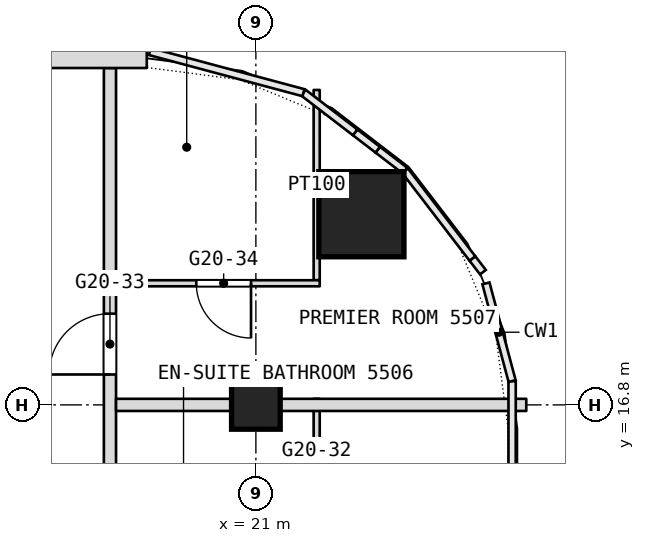
"""IFC4 building model, lengths in metres.
Left out: names, types, materials, properties, quantities, classifications, styles, units other than length and angle.
Written with IfcOpenShell. Run it as: python <this file> out.ifc"""

import sys

from ifc_helpers import new_model, si_unit, direction, frame, frame_2d, origin, origin_2d, place, context, subcontext, project, spatial, rectangle, extrude, element, fill, save


model = new_model("IFC4")
c1 = context("Model", 3, precision=1e-05, world=origin(), true_north=direction((0.0, 1.0)))
c2 = subcontext(c1, "Body", "Model", "MODEL_VIEW")
j1 = project(units=[si_unit("LENGTHUNIT", "METRE"), si_unit("PLANEANGLEUNIT", "RADIAN")], contexts=[c1])
p1 = place(None, origin())
s1 = spatial("IfcSite", under=j1, at=p1, CompositionType="ELEMENT")
p2 = place(p1, origin())
s2 = spatial("IfcBuilding", under=s1, at=p2, CompositionType="ELEMENT")
p3 = place(p2, frame((0.0, 0.0, 234.5)))
s3 = spatial("IfcBuildingStorey", under=s2, at=p3, CompositionType="ELEMENT", Elevation=234.5)
p4 = place(p3, frame((22.736, 19.936, 0.0), z_axis=(0.0, 0.0, 1.0), x_axis=(1.0, 0.0, 0.0)))
e1 = element("IfcColumn", 1, at=p4, inside=s3, PredefinedType="COLUMN", context=c2, shape_type="SweptSolid", body=[
    extrude(rectangle(XDim=1.4, YDim=1.4, at=origin_2d()), origin(), (0.0, 0.0, 1.0), 3.6),
])
p5 = place(p3, frame((21.0, 16.8, 0.0), z_axis=(0.0, 0.0, 1.0), x_axis=(1.0, 0.0, 0.0)))
e2 = element("IfcColumn", 2, at=p5, inside=s3, PredefinedType="COLUMN", context=c2, shape_type="SweptSolid", body=[
    extrude(rectangle(XDim=0.8, YDim=0.8, at=origin_2d()), origin(), (0.0, 0.0, 1.0), 3.6),
])
p6 = place(p3, frame((22.0, 14.45, 0.0), z_axis=(0.0, 0.0, 1.0), x_axis=(0.0, 1.0, 0.0)))
e3 = element("IfcWall", 3, at=p6, inside=s3, PredefinedType="PARTITIONING", context=c2, shape_type="SweptSolid", body=[
    extrude(rectangle(XDim=2.45, YDim=0.1, at=frame_2d((1.225, 0.0))), origin(), (0.0, 0.0, 1.0), 3.34),
])
p7 = place(p6, frame((0.15, 0.0, 0.0)))
e4 = element("IfcOpeningElement", 4, at=p7, cuts=e3, PredefinedType="OPENING", context=c2, shape_type="SweptSolid", body=[
    extrude(rectangle(XDim=0.9, YDim=2.1, at=frame_2d((0.45, 1.05))), frame((0.0, 0.05, 0.0), z_axis=(0.0, -1.0, 0.0), x_axis=(1.0, 0.0, 0.0)), (0.0, 0.0, 1.0), 0.1),
])
p8 = place(p3, frame((22.0, 18.85, 0.0), z_axis=(0.0, 0.0, 1.0), x_axis=(0.0, 1.0, 0.0)))
e5 = element("IfcWall", 5, at=p8, inside=s3, PredefinedType="PARTITIONING", context=c2, shape_type="SweptSolid", body=[
    extrude(rectangle(XDim=3.129, YDim=0.1, at=frame_2d((1.564, 0.0))), origin(), (0.0, 0.0, 1.0), 3.34),
])
p9 = place(p3, frame((18.6, -26.751, 0.0), z_axis=(0.0, 0.0, 1.0), x_axis=(0.0, 1.0, 0.0)))
e6 = element("IfcWall", 6, at=p9, inside=s3, PredefinedType="PARTITIONING", context=c2, shape_type="SweptSolid", body=[
    extrude(rectangle(XDim=49.091, YDim=0.2, at=frame_2d((24.545, 0.0))), origin(), (0.0, 0.0, 1.0), 3.34),
])
p10 = place(p9, frame((6.988, 0.0, 0.0)))
e7 = element("IfcOpeningElement", 7, at=p10, cuts=e6, PredefinedType="OPENING", context=c2, shape_type="SweptSolid", body=[
    extrude(rectangle(XDim=1.1, YDim=2.1, at=frame_2d((0.55, 1.05))), frame((0.0, 0.1, 0.0), z_axis=(0.0, -1.0, 0.0), x_axis=(1.0, 0.0, 0.0)), (0.0, 0.0, 1.0), 0.2),
])
p11 = place(p9, frame((13.551, 0.0, 0.0)))
e8 = element("IfcOpeningElement", 8, at=p11, cuts=e6, PredefinedType="OPENING", context=c2, shape_type="SweptSolid", body=[
    extrude(rectangle(XDim=1.1, YDim=2.1, at=frame_2d((0.55, 1.05))), frame((0.0, 0.1, 0.0), z_axis=(0.0, -1.0, 0.0), x_axis=(1.0, 0.0, 0.0)), (0.0, 0.0, 1.0), 0.2),
])
p12 = place(p9, frame((22.051, 0.0, 0.0)))
e9 = element("IfcOpeningElement", 9, at=p12, cuts=e6, PredefinedType="OPENING", context=c2, shape_type="SweptSolid", body=[
    extrude(rectangle(XDim=1.1, YDim=2.1, at=frame_2d((0.55, 1.05))), frame((0.0, 0.1, 0.0), z_axis=(0.0, -1.0, 0.0), x_axis=(1.0, 0.0, 0.0)), (0.0, 0.0, 1.0), 0.2),
])
p13 = place(p9, frame((28.301, 0.0, 0.0)))
e10 = element("IfcOpeningElement", 10, at=p13, cuts=e6, PredefinedType="OPENING", context=c2, shape_type="SweptSolid", body=[
    extrude(rectangle(XDim=1.1, YDim=2.1, at=frame_2d((0.55, 1.05))), frame((0.0, 0.1, 0.0), z_axis=(0.0, -1.0, 0.0), x_axis=(1.0, 0.0, 0.0)), (0.0, 0.0, 1.0), 0.2),
])
p14 = place(p9, frame((37.951, 0.0, 0.0)))
e11 = element("IfcOpeningElement", 11, at=p14, cuts=e6, PredefinedType="OPENING", context=c2, shape_type="SweptSolid", body=[
    extrude(rectangle(XDim=1.0, YDim=2.1, at=frame_2d((0.5, 1.05))), frame((0.0, 0.1, 0.0), z_axis=(0.0, -1.0, 0.0), x_axis=(1.0, 0.0, 0.0)), (0.0, 0.0, 1.0), 0.2),
])
p15 = place(p9, frame((39.751, 0.0, 0.0)))
e12 = element("IfcOpeningElement", 12, at=p15, cuts=e6, PredefinedType="OPENING", context=c2, shape_type="SweptSolid", body=[
    extrude(rectangle(XDim=1.0, YDim=2.1, at=frame_2d((0.5, 1.05))), frame((0.0, 0.1, 0.0), z_axis=(0.0, -1.0, 0.0), x_axis=(1.0, 0.0, 0.0)), (0.0, 0.0, 1.0), 0.2),
])
p16 = place(p9, frame((44.051, 0.0, 0.0)))
e13 = element("IfcOpeningElement", 13, at=p16, cuts=e6, PredefinedType="OPENING", context=c2, shape_type="SweptSolid", body=[
    extrude(rectangle(XDim=1.0, YDim=2.1, at=frame_2d((0.5, 1.05))), frame((0.0, 0.1, 0.0), z_axis=(0.0, -1.0, 0.0), x_axis=(1.0, 0.0, 0.0)), (0.0, 0.0, 1.0), 0.2),
])
p17 = place(p3, frame((18.7, 16.8, 0.0), z_axis=(0.0, 0.0, 1.0), x_axis=(1.0, 0.0, 0.0)))
e14 = element("IfcWall", 14, at=p17, inside=s3, PredefinedType="PARTITIONING", context=c2, shape_type="SweptSolid", body=[
    extrude(rectangle(XDim=6.747, YDim=0.2, at=frame_2d((3.374, 0.0))), origin(), (0.0, 0.0, 1.0), 2.94),
])
p18 = place(p3, frame((18.7, 18.8, 0.0), z_axis=(0.0, 0.0, 1.0), x_axis=(1.0, 0.0, 0.0)))
e15 = element("IfcWall", 15, at=p18, inside=s3, PredefinedType="PARTITIONING", context=c2, shape_type="SweptSolid", body=[
    extrude(rectangle(XDim=3.35, YDim=0.1, at=frame_2d((1.675, 0.0))), origin(), (0.0, 0.0, 1.0), 3.34),
])
p19 = place(p18, frame((1.32, 0.0, 0.0)))
e16 = element("IfcOpeningElement", 16, at=p19, cuts=e15, PredefinedType="OPENING", context=c2, shape_type="SweptSolid", body=[
    extrude(rectangle(XDim=0.9, YDim=2.1, at=frame_2d((0.45, 1.05))), frame((0.0, 0.05, 0.0), z_axis=(0.0, -1.0, 0.0), x_axis=(1.0, 0.0, 0.0)), (0.0, 0.0, 1.0), 0.1),
])
p20 = place(p3, frame((19.206, 22.49, 0.0), z_axis=(0.0, 0.0, 1.0), x_axis=(-1.0, 0.0, 0.0)))
e17 = element("IfcWall", 17, at=p20, inside=s3, PredefinedType="NOTDEFINED", context=c2, shape_type="SweptSolid", body=[
    extrude(rectangle(XDim=38.412, YDim=0.3, at=frame_2d((19.206, 0.0))), origin(), (0.0, 0.0, 1.0), 3.6),
])
p21 = place(p20, frame((3.306, 0.0, 0.9)))
e18 = element("IfcOpeningElement", 18, at=p21, cuts=e17, PredefinedType="OPENING", context=c2, shape_type="SweptSolid", body=[
    extrude(rectangle(XDim=2.4, YDim=2.1, at=frame_2d((1.2, 1.05))), frame((0.0, 0.15, 0.0), z_axis=(0.0, -1.0, 0.0), x_axis=(1.0, 0.0, 0.0)), (0.0, 0.0, 1.0), 0.3),
])
p22 = place(p20, frame((7.506, 0.0, 0.9)))
e19 = element("IfcOpeningElement", 19, at=p22, cuts=e17, PredefinedType="OPENING", context=c2, shape_type="SweptSolid", body=[
    extrude(rectangle(XDim=2.4, YDim=2.1, at=frame_2d((1.2, 1.05))), frame((0.0, 0.15, 0.0), z_axis=(0.0, -1.0, 0.0), x_axis=(1.0, 0.0, 0.0)), (0.0, 0.0, 1.0), 0.3),
])
p23 = place(p20, frame((11.706, 0.0, 0.9)))
e20 = element("IfcOpeningElement", 20, at=p23, cuts=e17, PredefinedType="OPENING", context=c2, shape_type="SweptSolid", body=[
    extrude(rectangle(XDim=2.4, YDim=2.1, at=frame_2d((1.2, 1.05))), frame((0.0, 0.15, 0.0), z_axis=(0.0, -1.0, 0.0), x_axis=(1.0, 0.0, 0.0)), (0.0, 0.0, 1.0), 0.3),
])
p24 = place(p20, frame((15.906, 0.0, 0.9)))
e21 = element("IfcOpeningElement", 21, at=p24, cuts=e17, PredefinedType="OPENING", context=c2, shape_type="SweptSolid", body=[
    extrude(rectangle(XDim=2.4, YDim=2.1, at=frame_2d((1.2, 1.05))), frame((0.0, 0.15, 0.0), z_axis=(0.0, -1.0, 0.0), x_axis=(1.0, 0.0, 0.0)), (0.0, 0.0, 1.0), 0.3),
])
p25 = place(p20, frame((20.106, 0.0, 0.9)))
e22 = element("IfcOpeningElement", 22, at=p25, cuts=e17, PredefinedType="OPENING", context=c2, shape_type="SweptSolid", body=[
    extrude(rectangle(XDim=2.4, YDim=2.1, at=frame_2d((1.2, 1.05))), frame((0.0, 0.15, 0.0), z_axis=(0.0, -1.0, 0.0), x_axis=(1.0, 0.0, 0.0)), (0.0, 0.0, 1.0), 0.3),
])
p26 = place(p20, frame((24.306, 0.0, 0.9)))
e23 = element("IfcOpeningElement", 23, at=p26, cuts=e17, PredefinedType="OPENING", context=c2, shape_type="SweptSolid", body=[
    extrude(rectangle(XDim=2.4, YDim=2.1, at=frame_2d((1.2, 1.05))), frame((0.0, 0.15, 0.0), z_axis=(0.0, -1.0, 0.0), x_axis=(1.0, 0.0, 0.0)), (0.0, 0.0, 1.0), 0.3),
])
p27 = place(p20, frame((28.506, 0.0, 0.9)))
e24 = element("IfcOpeningElement", 24, at=p27, cuts=e17, PredefinedType="OPENING", context=c2, shape_type="SweptSolid", body=[
    extrude(rectangle(XDim=2.4, YDim=2.1, at=frame_2d((1.2, 1.05))), frame((0.0, 0.15, 0.0), z_axis=(0.0, -1.0, 0.0), x_axis=(1.0, 0.0, 0.0)), (0.0, 0.0, 1.0), 0.3),
])
p28 = place(p20, frame((32.706, 0.0, 0.9)))
e25 = element("IfcOpeningElement", 25, at=p28, cuts=e17, PredefinedType="OPENING", context=c2, shape_type="SweptSolid", body=[
    extrude(rectangle(XDim=2.4, YDim=2.1, at=frame_2d((1.2, 1.05))), frame((0.0, 0.15, 0.0), z_axis=(0.0, -1.0, 0.0), x_axis=(1.0, 0.0, 0.0)), (0.0, 0.0, 1.0), 0.3),
])
p29 = place(p16, origin())
e26 = element("IfcDoor", 26, at=p29, inside=s3, OperationType="SINGLE_SWING_LEFT", PredefinedType="DOOR", context=c2, shape_type="SweptSolid", body=[
    extrude(rectangle(XDim=1.0, YDim=2.1, at=frame_2d((0.5, 1.05))), frame((0.0, 0.025, 0.0), z_axis=(0.0, -1.0, 0.0), x_axis=(1.0, 0.0, 0.0)), (0.0, 0.0, 1.0), 0.05),
])
fill(e13, e26)
p30 = place(p19, origin())
e27 = element("IfcDoor", 27, at=p30, inside=s3, OperationType="SINGLE_SWING_RIGHT", PredefinedType="DOOR", context=c2, shape_type="SweptSolid", body=[
    extrude(rectangle(XDim=0.9, YDim=2.1, at=frame_2d((0.45, 1.05))), frame((0.0, 0.025, 0.0), z_axis=(0.0, -1.0, 0.0), x_axis=(1.0, 0.0, 0.0)), (0.0, 0.0, 1.0), 0.05),
])
fill(e16, e27)
save(model, sys.argv[1])
